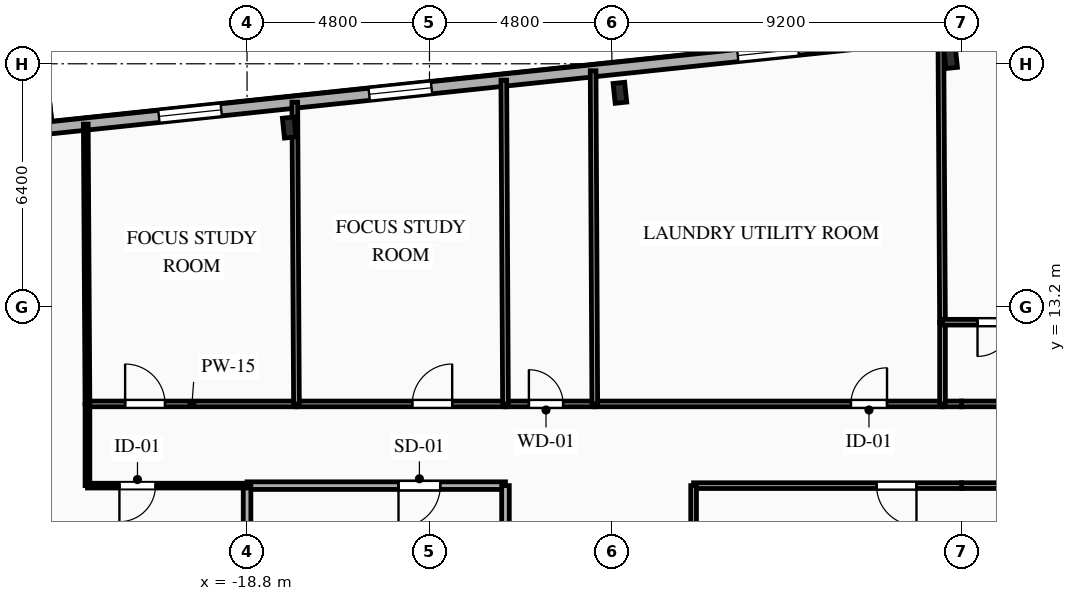
"""IFC4 building model, lengths in metres.
Left out: names, types, materials, properties, quantities, classifications, styles, units other than length and angle.
Written with IfcOpenShell. Run it as: python <this file> out.ifc"""

import sys

from ifc_helpers import new_model, si_unit, direction, frame, frame_2d, origin, origin_2d, place, context, subcontext, project, spatial, rectangle, i_section, extrude, element, fill, save


model = new_model("IFC4")
c1 = context("Model", 3, precision=1e-05, world=origin(), true_north=direction((0.0, 1.0)))
c2 = subcontext(c1, "Body", "Model", "MODEL_VIEW")
j1 = project(units=[si_unit("LENGTHUNIT", "METRE"), si_unit("PLANEANGLEUNIT", "RADIAN")], contexts=[c1])
p1 = place(None, origin())
s1 = spatial("IfcSite", under=j1, at=p1, CompositionType="ELEMENT")
p2 = place(p1, origin())
s2 = spatial("IfcBuilding", under=s1, at=p2, CompositionType="ELEMENT")
p3 = place(p2, frame((0.0, 0.0, 92.4)))
s3 = spatial("IfcBuildingStorey", under=s2, at=p3, CompositionType="ELEMENT", Elevation=92.4)
for number, where, z_axis, x_axis in (
    (1, (-0.287, 19.751, 0.0), (0.0, 0.0, 1.0), (0.995, 0.105, 0.0)),
    (2, (-8.989, 18.836, 0.0), (0.0, 0.0, 1.0), (0.995, 0.105, 0.0)),
    (3, (-17.691, 17.922, 0.0), (0.0, 0.0, 1.0), (0.995, 0.105, 0.0)),
):
    element("IfcColumn", number, at=place(p3, frame(where, z_axis=z_axis, x_axis=x_axis)), inside=s3, PredefinedType="COLUMN", context=c2, shape_type="SweptSolid", body=[
        extrude(i_section(OverallWidth=0.306, OverallDepth=0.524, WebThickness=0.021, FlangeThickness=0.04, FilletRadius=0.027, at=origin_2d()), origin(), (0.0, 0.0, 1.0), 3.35),
    ])
p4 = place(p3, frame((-27.107, 17.586, 0.0), z_axis=(0.0, 0.0, 1.0), x_axis=(0.994521628355, 0.104531003701, 0.0)))
e4 = element("IfcWall", 4, at=p4, inside=s3, PredefinedType="SOLIDWALL", context=c2, shape_type="SweptSolid", body=[
    extrude(rectangle(XDim=53.8, YDim=0.32, at=frame_2d((26.9, 0.0))), origin(), (0.0, 0.0, 1.0), 3.045),
])
p5 = place(p4, frame((1.482, 0.0, 0.85)))
e5 = element("IfcOpeningElement", 5, at=p5, cuts=e4, PredefinedType="OPENING", context=c2, shape_type="SweptSolid", body=[
    extrude(rectangle(XDim=1.6, YDim=1.85, at=frame_2d((0.8, 0.925))), frame((0.0, 0.17, 0.0), z_axis=(0.0, -1.0, 0.0), x_axis=(1.0, 0.0, 0.0)), (0.0, 0.0, 1.0), 0.34),
])
p6 = place(p4, frame((6.02, 0.0, 0.85)))
e6 = element("IfcOpeningElement", 6, at=p6, cuts=e4, PredefinedType="OPENING", context=c2, shape_type="SweptSolid", body=[
    extrude(rectangle(XDim=1.65, YDim=1.85, at=frame_2d((0.825, 0.925))), frame((0.0, 0.17, 0.0), z_axis=(0.0, -1.0, 0.0), x_axis=(1.0, 0.0, 0.0)), (0.0, 0.0, 1.0), 0.34),
])
p7 = place(p4, frame((11.584, 0.0, 0.85)))
e7 = element("IfcOpeningElement", 7, at=p7, cuts=e4, PredefinedType="OPENING", context=c2, shape_type="SweptSolid", body=[
    extrude(rectangle(XDim=1.65, YDim=1.85, at=frame_2d((0.825, 0.925))), frame((0.0, 0.17, 0.0), z_axis=(0.0, -1.0, 0.0), x_axis=(1.0, 0.0, 0.0)), (0.0, 0.0, 1.0), 0.34),
])
p8 = place(p4, frame((21.336, 0.0, 0.85)))
e8 = element("IfcOpeningElement", 8, at=p8, cuts=e4, PredefinedType="OPENING", context=c2, shape_type="SweptSolid", body=[
    extrude(rectangle(XDim=1.6, YDim=1.85, at=frame_2d((0.8, 0.925))), frame((0.0, 0.17, 0.0), z_axis=(0.0, -1.0, 0.0), x_axis=(1.0, 0.0, 0.0)), (0.0, 0.0, 1.0), 0.34),
])
p9 = place(p4, frame((31.404, 0.0, 0.85)))
e9 = element("IfcOpeningElement", 9, at=p9, cuts=e4, PredefinedType="OPENING", context=c2, shape_type="SweptSolid", body=[
    extrude(rectangle(XDim=2.2, YDim=1.85, at=frame_2d((1.1, 0.925))), frame((0.0, 0.17, 0.0), z_axis=(0.0, -1.0, 0.0), x_axis=(1.0, 0.0, 0.0)), (0.0, 0.0, 1.0), 0.34),
])
p10 = place(p4, frame((40.486, 0.0, 0.85)))
e10 = element("IfcOpeningElement", 10, at=p10, cuts=e4, PredefinedType="OPENING", context=c2, shape_type="SweptSolid", body=[
    extrude(rectangle(XDim=1.65, YDim=1.85, at=frame_2d((0.825, 0.925))), frame((0.0, 0.17, 0.0), z_axis=(0.0, -1.0, 0.0), x_axis=(1.0, 0.0, 0.0)), (0.0, 0.0, 1.0), 0.34),
])
p11 = place(p4, frame((46.53, 0.0, 0.85)))
e11 = element("IfcOpeningElement", 11, at=p11, cuts=e4, PredefinedType="OPENING", context=c2, shape_type="SweptSolid", body=[
    extrude(rectangle(XDim=1.65, YDim=1.85, at=frame_2d((0.825, 0.925))), frame((0.0, 0.17, 0.0), z_axis=(0.0, -1.0, 0.0), x_axis=(1.0, 0.0, 0.0)), (0.0, 0.0, 1.0), 0.34),
])
p12 = place(p4, frame((51.054, 0.0, 0.85)))
e12 = element("IfcOpeningElement", 12, at=p12, cuts=e4, PredefinedType="OPENING", context=c2, shape_type="SweptSolid", body=[
    extrude(rectangle(XDim=1.65, YDim=1.85, at=frame_2d((0.825, 0.925))), frame((0.0, 0.17, 0.0), z_axis=(0.0, -1.0, 0.0), x_axis=(1.0, 0.0, 0.0)), (0.0, 0.0, 1.0), 0.34),
])
p13 = place(p3, frame((-12.0, 8.5, 0.0), z_axis=(0.0, 0.0, 1.0), x_axis=(-1.0, 0.0, 0.0)))
e13 = element("IfcWall", 13, at=p13, inside=s3, PredefinedType="PARTITIONING", context=c2, shape_type="SweptSolid", body=[
    extrude(rectangle(XDim=6.8, YDim=0.2, at=frame_2d((3.4, 0.0))), origin(), (0.0, 0.0, 1.0), 3.045),
])
p14 = place(p13, frame((1.715, 0.0, 0.0)))
e14 = element("IfcOpeningElement", 14, at=p14, cuts=e13, PredefinedType="OPENING", context=c2, shape_type="SweptSolid", body=[
    extrude(rectangle(XDim=1.1, YDim=2.15, at=frame_2d((0.55, 1.075))), frame((0.0, 0.11, 0.0), z_axis=(0.0, -1.0, 0.0), x_axis=(1.0, 0.0, 0.0)), (0.0, 0.0, 1.0), 0.22),
])
p15 = place(p3, frame((-12.0, 5.6, 0.0), z_axis=(0.0, 0.0, 1.0), x_axis=(0.0, 1.0, 0.0)))
e15 = element("IfcWall", 15, at=p15, inside=s3, PredefinedType="PARTITIONING", context=c2, shape_type="SweptSolid", body=[
    extrude(rectangle(XDim=2.9, YDim=0.2, at=frame_2d((1.45, 0.0))), origin(), (0.0, 0.0, 1.0), 3.045),
])
p16 = place(p3, frame((-18.8, 8.5, 0.0), z_axis=(0.0, 0.0, 1.0), x_axis=(0.0, -1.0, 0.0)))
e16 = element("IfcWall", 16, at=p16, inside=s3, PredefinedType="PARTITIONING", context=c2, shape_type="SweptSolid", body=[
    extrude(rectangle(XDim=2.9, YDim=0.2, at=frame_2d((1.45, 0.0))), origin(), (0.0, 0.0, 1.0), 2.53),
])
p17 = place(p3, frame((-18.8, 8.5, 0.0), z_axis=(0.0, 0.0, 1.0), x_axis=(-1.0, 0.0, 0.0)))
e17 = element("IfcWall", 17, at=p17, inside=s3, PredefinedType="PARTITIONING", context=c2, shape_type="SweptSolid", body=[
    extrude(rectangle(XDim=4.2, YDim=0.125, at=frame_2d((2.1, 0.0))), origin(), (0.0, 0.0, 1.0), 3.045),
])
p18 = place(p17, frame((2.409, 0.0, 0.0)))
e18 = element("IfcOpeningElement", 18, at=p18, cuts=e17, PredefinedType="OPENING", context=c2, shape_type="SweptSolid", body=[
    extrude(rectangle(XDim=0.95, YDim=2.1, at=frame_2d((0.475, 1.05))), frame((0.0, 0.073, 0.0), z_axis=(0.0, -1.0, 0.0), x_axis=(1.0, 0.0, 0.0)), (0.0, 0.0, 1.0), 0.145),
])
p19 = place(p3, frame((-23.0, 8.5, 0.0), z_axis=(0.0, 0.0, 1.0), x_axis=(0.0, 1.0, 0.0)))
e19 = element("IfcWall", 19, at=p19, inside=s3, PredefinedType="PARTITIONING", context=c2, shape_type="SweptSolid", body=[
    extrude(rectangle(XDim=2.15, YDim=0.125, at=frame_2d((1.075, 0.0))), origin(), (0.0, 0.0, 1.0), 3.045),
])
p20 = place(p3, frame((-23.0, 10.65, 0.0), z_axis=(0.0, 0.0, 1.0), x_axis=(1.0, 0.0, 0.0)))
e20 = element("IfcWall", 20, at=p20, inside=s3, PredefinedType="PARTITIONING", context=c2, shape_type="SweptSolid", body=[
    extrude(rectangle(XDim=5.5, YDim=0.15, at=frame_2d((2.75, 0.0))), origin(), (0.0, 0.0, 1.0), 3.045),
])
p21 = place(p20, frame((0.991, 0.0, 0.0)))
e21 = element("IfcOpeningElement", 21, at=p21, cuts=e20, PredefinedType="OPENING", context=c2, shape_type="SweptSolid", body=[
    extrude(rectangle(XDim=1.05, YDim=2.15, at=frame_2d((0.525, 1.075))), frame((0.0, 0.085, 0.0), z_axis=(0.0, -1.0, 0.0), x_axis=(1.0, 0.0, 0.0)), (0.0, 0.0, 1.0), 0.17),
])
p22 = place(p3, frame((-17.5, 10.65, 0.0), z_axis=(0.0, 0.0, 1.0), x_axis=(1.0, 0.0, 0.0)))
e22 = element("IfcWall", 22, at=p22, inside=s3, PredefinedType="PARTITIONING", context=c2, shape_type="SweptSolid", body=[
    extrude(rectangle(XDim=5.5, YDim=0.15, at=frame_2d((2.75, 0.0))), origin(), (0.0, 0.0, 1.0), 3.045),
])
p23 = place(p22, frame((3.048, 0.0, 0.0)))
e23 = element("IfcOpeningElement", 23, at=p23, cuts=e22, PredefinedType="OPENING", context=c2, shape_type="SweptSolid", body=[
    extrude(rectangle(XDim=1.05, YDim=2.15, at=frame_2d((0.525, 1.075))), frame((0.0, 0.085, 0.0), z_axis=(0.0, -1.0, 0.0), x_axis=(1.0, 0.0, 0.0)), (0.0, 0.0, 1.0), 0.17),
])
p24 = place(p3, frame((-12.0, 10.65, 0.0), z_axis=(0.0, 0.0, 1.0), x_axis=(1.0, 0.0, 0.0)))
e24 = element("IfcWall", 24, at=p24, inside=s3, PredefinedType="PLUMBINGWALL", context=c2, shape_type="SweptSolid", body=[
    extrude(rectangle(XDim=2.35, YDim=0.15, at=frame_2d((1.175, 0.0))), origin(), (0.0, 0.0, 1.0), 3.045),
])
p25 = place(p24, frame((0.616, 0.0, 0.0)))
e25 = element("IfcOpeningElement", 25, at=p25, cuts=e24, PredefinedType="OPENING", context=c2, shape_type="SweptSolid", body=[
    extrude(rectangle(XDim=0.9, YDim=2.1, at=frame_2d((0.45, 1.05))), frame((0.0, 0.085, 0.0), z_axis=(0.0, -1.0, 0.0), x_axis=(1.0, 0.0, 0.0)), (0.0, 0.0, 1.0), 0.17),
])
p26 = place(p3, frame((-9.65, 10.65, 0.0), z_axis=(0.0, 0.0, 1.0), x_axis=(1.0, 0.0, 0.0)))
e26 = element("IfcWall", 26, at=p26, inside=s3, PredefinedType="PARTITIONING", context=c2, shape_type="SweptSolid", body=[
    extrude(rectangle(XDim=9.15, YDim=0.15, at=frame_2d((4.575, 0.0))), origin(), (0.0, 0.0, 1.0), 3.045),
])
p27 = place(p26, frame((6.74, 0.0, 0.0)))
e27 = element("IfcOpeningElement", 27, at=p27, cuts=e26, PredefinedType="OPENING", context=c2, shape_type="SweptSolid", body=[
    extrude(rectangle(XDim=0.95, YDim=2.1, at=frame_2d((0.475, 1.05))), frame((0.0, 0.085, 0.0), z_axis=(0.0, -1.0, 0.0), x_axis=(1.0, 0.0, 0.0)), (0.0, 0.0, 1.0), 0.17),
])
p28 = place(p3, frame((-0.5, 10.65, 0.0), z_axis=(0.0, 0.0, 1.0), x_axis=(1.0, 0.0, 0.0)))
e28 = element("IfcWall", 28, at=p28, inside=s3, PredefinedType="PLUMBINGWALL", context=c2, shape_type="SweptSolid", body=[
    extrude(rectangle(XDim=0.5, YDim=0.15, at=frame_2d((0.25, 0.0))), origin(), (0.0, 0.0, 1.0), 3.045),
])
p29 = place(p3, frame((0.0, 8.5, 0.0), z_axis=(0.0, 0.0, 1.0), x_axis=(-1.0, 0.0, 0.0)))
e29 = element("IfcWall", 29, at=p29, inside=s3, PredefinedType="PARTITIONING", context=c2, shape_type="SweptSolid", body=[
    extrude(rectangle(XDim=7.05, YDim=0.15, at=frame_2d((3.525, 0.0))), origin(), (0.0, 0.0, 1.0), 3.045),
])
p30 = place(p29, frame((1.185, 0.0, 0.0)))
e30 = element("IfcOpeningElement", 30, at=p30, cuts=e29, PredefinedType="OPENING", context=c2, shape_type="SweptSolid", body=[
    extrude(rectangle(XDim=1.05, YDim=2.15, at=frame_2d((0.525, 1.075))), frame((0.0, 0.085, 0.0), z_axis=(0.0, -1.0, 0.0), x_axis=(1.0, 0.0, 0.0)), (0.0, 0.0, 1.0), 0.17),
])
p31 = place(p3, frame((0.0, 10.65, 0.0), z_axis=(0.0, 0.0, 1.0), x_axis=(1.0, 0.0, 0.0)))
e31 = element("IfcWall", 31, at=p31, inside=s3, PredefinedType="PLUMBINGWALL", context=c2, shape_type="SweptSolid", body=[
    extrude(rectangle(XDim=1.95, YDim=0.15, at=frame_2d((0.975, 0.0))), origin(), (0.0, 0.0, 1.0), 3.045),
])
for number, where, z_axis, x_axis in (
    (32, (7.05, 8.5, 0.0), (0.0, 0.0, 1.0), (-1.0, 0.0, 0.0)),
    (33, (-7.05, 8.5, 0.0), (0.0, 0.0, 1.0), (0.0, -1.0, 0.0)),
):
    element("IfcWall", number, at=place(p3, frame(where, z_axis=z_axis, x_axis=x_axis)), inside=s3, PredefinedType="PARTITIONING", context=c2, shape_type="SweptSolid", body=[
        extrude(rectangle(XDim=7.05, YDim=0.15, at=frame_2d((3.525, 0.0))), origin(), (0.0, 0.0, 1.0), 3.045),
    ])
p32 = place(p3, frame((-23.044, 18.013, 0.0), z_axis=(0.0, 0.0, 1.0), x_axis=(0.005968459246, -0.999982188588, 0.0)))
e34 = element("IfcWall", 34, at=p32, inside=s3, PredefinedType="PARTITIONING", context=c2, shape_type="SweptSolid", body=[
    extrude(rectangle(XDim=7.363, YDim=0.125, at=frame_2d((3.682, 0.0))), origin(), (0.0, 0.0, 1.0), 3.045),
])
p33 = place(p3, frame((-17.544, 18.591, 0.0), z_axis=(0.0, 0.0, 1.0), x_axis=(0.005533949572, -0.999984687584, 0.0)))
e35 = element("IfcWall", 35, at=p33, inside=s3, PredefinedType="PARTITIONING", context=c2, shape_type="SweptSolid", body=[
    extrude(rectangle(XDim=7.941, YDim=0.15, at=frame_2d((3.97, 0.0))), origin(), (0.0, 0.0, 1.0), 2.53),
])
p34 = place(p3, frame((-12.044, 19.169, 0.0), z_axis=(0.0, 0.0, 1.0), x_axis=(0.005158411336, -0.999986695308, 0.0)))
e36 = element("IfcWall", 36, at=p34, inside=s3, PredefinedType="PLUMBINGWALL", context=c2, shape_type="SweptSolid", body=[
    extrude(rectangle(XDim=8.519, YDim=0.15, at=frame_2d((4.26, 0.0))), origin(), (0.0, 0.0, 1.0), 3.045),
])
p35 = place(p3, frame((-9.694, 19.416, 0.0), z_axis=(0.0, 0.0, 1.0), x_axis=(0.005013026743, -0.999987434702, 0.0)))
e37 = element("IfcWall", 37, at=p35, inside=s3, PredefinedType="PLUMBINGWALL", context=c2, shape_type="SweptSolid", body=[
    extrude(rectangle(XDim=8.766, YDim=0.15, at=frame_2d((4.383, 0.0))), origin(), (0.0, 0.0, 1.0), 3.045),
])
p36 = place(p3, frame((-0.544, 20.378, 0.0), z_axis=(0.0, 0.0, 1.0), x_axis=(0.005799245221, -0.999983184236, 0.0)))
e38 = element("IfcWall", 38, at=p36, inside=s3, PredefinedType="PARTITIONING", context=c2, shape_type="SweptSolid", body=[
    extrude(rectangle(XDim=7.578, YDim=0.15, at=frame_2d((3.789, 0.0))), origin(), (0.0, 0.0, 1.0), 3.045),
])
p37 = place(p3, frame((-0.5, 12.8, 0.0), z_axis=(0.0, 0.0, 1.0), x_axis=(0.0, -1.0, 0.0)))
e39 = element("IfcWall", 39, at=p37, inside=s3, PredefinedType="PLUMBINGWALL", context=c2, shape_type="SweptSolid", body=[
    extrude(rectangle(XDim=2.15, YDim=0.15, at=frame_2d((1.075, 0.0))), origin(), (0.0, 0.0, 1.0), 3.045),
])
p38 = place(p3, frame((1.95, 12.8, 0.0), z_axis=(0.0, 0.0, 1.0), x_axis=(-1.0, 0.0, 0.0)))
e40 = element("IfcWall", 40, at=p38, inside=s3, PredefinedType="PLUMBINGWALL", context=c2, shape_type="SweptSolid", body=[
    extrude(rectangle(XDim=2.45, YDim=0.15, at=frame_2d((1.225, 0.0))), origin(), (0.0, 0.0, 1.0), 3.045),
])
p39 = place(p38, frame((0.629, 0.0, 0.0)))
e41 = element("IfcOpeningElement", 41, at=p39, cuts=e40, PredefinedType="OPENING", context=c2, shape_type="SweptSolid", body=[
    extrude(rectangle(XDim=0.9, YDim=2.1, at=frame_2d((0.45, 1.05))), frame((0.0, 0.085, 0.0), z_axis=(0.0, -1.0, 0.0), x_axis=(1.0, 0.0, 0.0)), (0.0, 0.0, 1.0), 0.17),
])
p40 = place(p6, origin())
e42 = element("IfcWindow", 42, at=p40, inside=s3, PartitioningType="SINGLE_PANEL", PredefinedType="WINDOW", context=c2, shape_type="SweptSolid", body=[
    extrude(rectangle(XDim=1.65, YDim=1.85, at=frame_2d((0.825, 0.925))), frame((0.0, 0.03, 0.0), z_axis=(0.0, -1.0, 0.0), x_axis=(1.0, 0.0, 0.0)), (0.0, 0.0, 1.0), 0.06),
])
fill(e6, e42)
p41 = place(p7, origin())
e43 = element("IfcWindow", 43, at=p41, inside=s3, PartitioningType="SINGLE_PANEL", PredefinedType="WINDOW", context=c2, shape_type="SweptSolid", body=[
    extrude(rectangle(XDim=1.65, YDim=1.85, at=frame_2d((0.825, 0.925))), frame((0.0, 0.03, 0.0), z_axis=(0.0, -1.0, 0.0), x_axis=(1.0, 0.0, 0.0)), (0.0, 0.0, 1.0), 0.06),
])
fill(e7, e43)
p42 = place(p8, origin())
e44 = element("IfcWindow", 44, at=p42, inside=s3, PartitioningType="SINGLE_PANEL", PredefinedType="WINDOW", context=c2, shape_type="SweptSolid", body=[
    extrude(rectangle(XDim=1.6, YDim=1.85, at=frame_2d((0.8, 0.925))), frame((0.0, 0.03, 0.0), z_axis=(0.0, -1.0, 0.0), x_axis=(1.0, 0.0, 0.0)), (0.0, 0.0, 1.0), 0.06),
])
fill(e8, e44)
p43 = place(p14, origin())
e45 = element("IfcDoor", 45, at=p43, inside=s3, OperationType="SINGLE_SWING_RIGHT", PredefinedType="DOOR", context=c2, shape_type="SweptSolid", body=[
    extrude(rectangle(XDim=1.1, YDim=2.15, at=frame_2d((0.55, 1.075))), frame((0.0, 0.025, 0.0), z_axis=(0.0, -1.0, 0.0), x_axis=(1.0, 0.0, 0.0)), (0.0, 0.0, 1.0), 0.05),
])
fill(e14, e45)
p44 = place(p18, origin())
e46 = element("IfcDoor", 46, at=p44, inside=s3, OperationType="SINGLE_SWING_RIGHT", PredefinedType="DOOR", context=c2, shape_type="SweptSolid", body=[
    extrude(rectangle(XDim=0.95, YDim=2.1, at=frame_2d((0.475, 1.05))), frame((0.0, 0.025, 0.0), z_axis=(0.0, -1.0, 0.0), x_axis=(1.0, 0.0, 0.0)), (0.0, 0.0, 1.0), 0.05),
])
fill(e18, e46)
p45 = place(p21, origin())
e47 = element("IfcDoor", 47, at=p45, inside=s3, OperationType="SINGLE_SWING_LEFT", PredefinedType="DOOR", context=c2, shape_type="SweptSolid", body=[
    extrude(rectangle(XDim=1.05, YDim=2.15, at=frame_2d((0.525, 1.075))), frame((0.0, 0.025, 0.0), z_axis=(0.0, -1.0, 0.0), x_axis=(1.0, 0.0, 0.0)), (0.0, 0.0, 1.0), 0.05),
])
fill(e21, e47)
p46 = place(p23, origin())
e48 = element("IfcDoor", 48, at=p46, inside=s3, OperationType="SINGLE_SWING_RIGHT", PredefinedType="DOOR", context=c2, shape_type="SweptSolid", body=[
    extrude(rectangle(XDim=1.05, YDim=2.15, at=frame_2d((0.525, 1.075))), frame((0.0, 0.025, 0.0), z_axis=(0.0, -1.0, 0.0), x_axis=(1.0, 0.0, 0.0)), (0.0, 0.0, 1.0), 0.05),
])
fill(e23, e48)
p47 = place(p25, origin())
e49 = element("IfcDoor", 49, at=p47, inside=s3, OperationType="SINGLE_SWING_LEFT", PredefinedType="DOOR", context=c2, shape_type="SweptSolid", body=[
    extrude(rectangle(XDim=0.9, YDim=2.1, at=frame_2d((0.45, 1.05))), frame((0.0, 0.025, 0.0), z_axis=(0.0, -1.0, 0.0), x_axis=(1.0, 0.0, 0.0)), (0.0, 0.0, 1.0), 0.05),
])
fill(e25, e49)
p48 = place(p27, origin())
e50 = element("IfcDoor", 50, at=p48, inside=s3, OperationType="SINGLE_SWING_RIGHT", PredefinedType="DOOR", context=c2, shape_type="SweptSolid", body=[
    extrude(rectangle(XDim=0.95, YDim=2.1, at=frame_2d((0.475, 1.05))), frame((0.0, 0.025, 0.0), z_axis=(0.0, -1.0, 0.0), x_axis=(1.0, 0.0, 0.0)), (0.0, 0.0, 1.0), 0.05),
])
fill(e27, e50)
p49 = place(p30, origin())
e51 = element("IfcDoor", 51, at=p49, inside=s3, OperationType="SINGLE_SWING_LEFT", PredefinedType="DOOR", context=c2, shape_type="SweptSolid", body=[
    extrude(rectangle(XDim=1.05, YDim=2.15, at=frame_2d((0.525, 1.075))), frame((0.0, 0.025, 0.0), z_axis=(0.0, -1.0, 0.0), x_axis=(1.0, 0.0, 0.0)), (0.0, 0.0, 1.0), 0.05),
])
fill(e30, e51)
p50 = place(p39, origin())
e52 = element("IfcDoor", 52, at=p50, inside=s3, OperationType="SINGLE_SWING_RIGHT", PredefinedType="DOOR", context=c2, shape_type="SweptSolid", body=[
    extrude(rectangle(XDim=0.9, YDim=2.1, at=frame_2d((0.45, 1.05))), frame((0.0, 0.025, 0.0), z_axis=(0.0, -1.0, 0.0), x_axis=(1.0, 0.0, 0.0)), (0.0, 0.0, 1.0), 0.05),
])
fill(e41, e52)
save(model, sys.argv[1])
